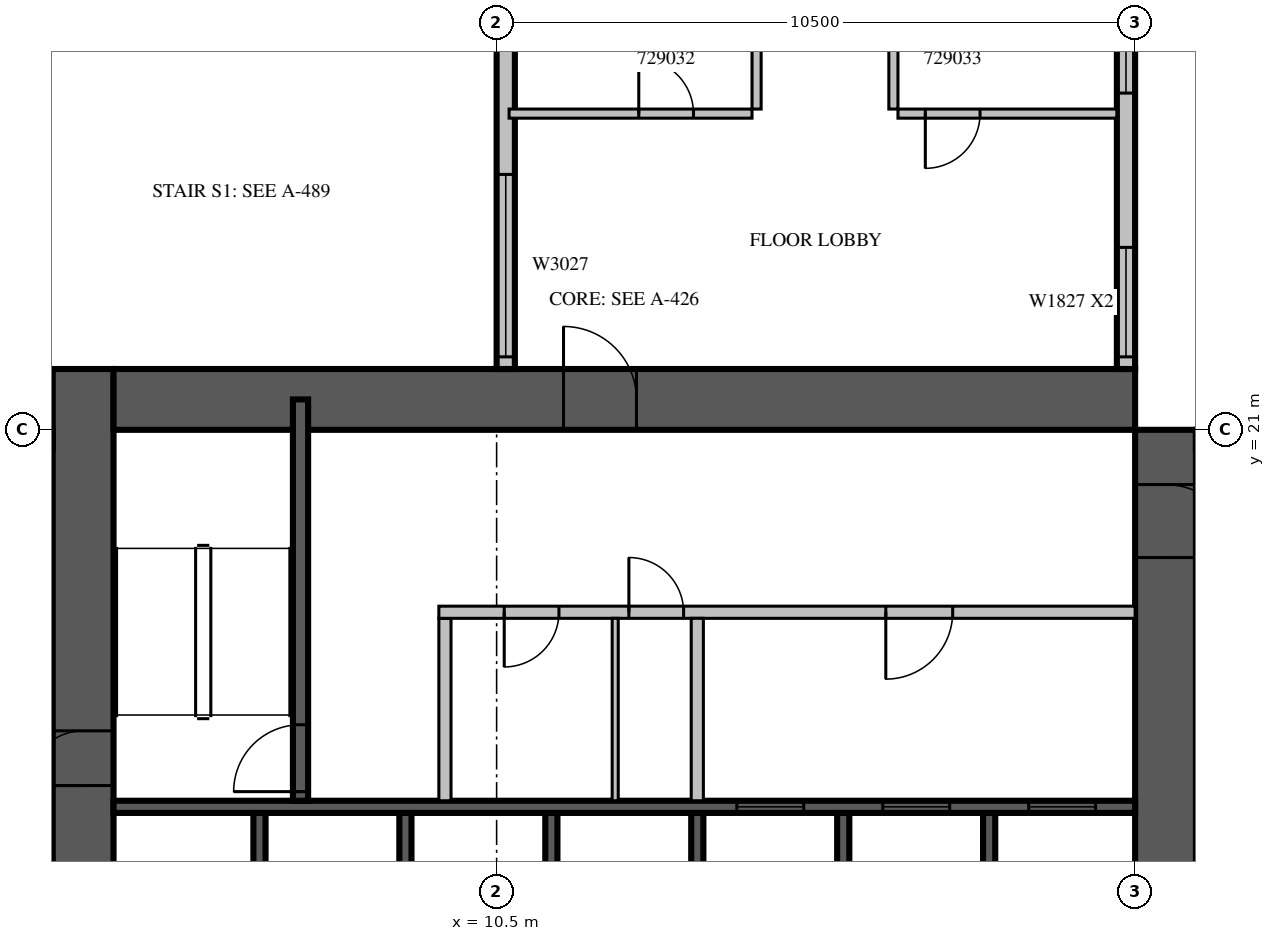
"""IFC4 building model, lengths in metres.
Left out: names, types, materials, properties, quantities, classifications, styles, units other than length and angle.
Written with IfcOpenShell. Run it as: python <this file> out.ifc"""

import sys

from ifc_helpers import new_model, si_unit, direction, frame, frame_2d, origin, place, context, subcontext, project, spatial, rectangle, extrude, source, transform, mapped, element, fill, save


model = new_model("IFC4")
c1 = context("Model", 3, precision=1e-05, world=origin(), true_north=direction((0.0, 1.0)))
c2 = subcontext(c1, "Body", "Model", "MODEL_VIEW")
j1 = project(units=[si_unit("LENGTHUNIT", "METRE"), si_unit("PLANEANGLEUNIT", "RADIAN")], contexts=[c1])
p1 = place(None, origin())
s1 = spatial("IfcSite", under=j1, at=p1, CompositionType="ELEMENT")
p2 = place(p1, origin())
s2 = spatial("IfcBuilding", under=s1, at=p2, CompositionType="ELEMENT")
p3 = place(p2, frame((0.0, 0.0, 132.9)))
s3 = spatial("IfcBuildingStorey", under=s2, at=p3, CompositionType="ELEMENT", Elevation=132.9)
m1 = source(origin(), c2, "Body", "SweptSolid", [
    extrude(rectangle(XDim=17.8, YDim=1.0, at=frame_2d((8.9, 0.0))), origin(), (0.0, 0.0, 1.0), 4.2),
])
p4 = place(p3, frame((3.7, 4.2, 0.0), z_axis=(0.0, 0.0, 1.0), x_axis=(0.0, 1.0, 0.0)))
e1 = element("IfcWall", 1, at=p4, inside=s3, PredefinedType="SHEAR", context=c2, shape_type="MappedRepresentation", body=[
    mapped(m1, transform((0.0, 0.0, 0.0), scale=1.0)),
])
m2 = source(origin(), c2, "Body", "SweptSolid", [
    extrude(rectangle(XDim=2.2, YDim=2.1, at=frame_2d((1.1, 1.05))), frame((0.0, 0.51, 0.0), z_axis=(0.0, -1.0, 0.0), x_axis=(1.0, 0.0, 0.0)), (0.0, 0.0, 1.0), 1.02),
])
p5 = place(p4, frame((4.2, 0.0, 0.0)))
e2 = element("IfcOpeningElement", 2, at=p5, cuts=e1, PredefinedType="OPENING", context=c2, shape_type="MappedRepresentation", body=[
    mapped(m2, transform((0.0, 0.0, 0.0), scale=1.0)),
])
m3 = source(origin(), c2, "Body", "SweptSolid", [
    extrude(rectangle(XDim=0.9, YDim=2.1, at=frame_2d((0.45, 1.05))), frame((0.0, 0.51, 0.0), z_axis=(0.0, -1.0, 0.0), x_axis=(1.0, 0.0, 0.0)), (0.0, 0.0, 1.0), 1.02),
])
p6 = place(p4, frame((10.95, 0.0, 0.0)))
e3 = element("IfcOpeningElement", 3, at=p6, cuts=e1, PredefinedType="OPENING", context=c2, shape_type="MappedRepresentation", body=[
    mapped(m3, transform((0.0, 0.0, 0.0), scale=1.0)),
])
m4 = source(origin(), c2, "Body", "SweptSolid", [
    extrude(rectangle(XDim=16.8, YDim=1.0, at=frame_2d((8.4, 0.0))), origin(), (0.0, 0.0, 1.0), 4.2),
])
p7 = place(p3, frame((21.5, 4.2, 0.0), z_axis=(0.0, 0.0, 1.0), x_axis=(0.0, 1.0, 0.0)))
e4 = element("IfcWall", 4, at=p7, inside=s3, PredefinedType="SHEAR", context=c2, shape_type="MappedRepresentation", body=[
    mapped(m4, transform((0.0, 0.0, 0.0), scale=1.0)),
])
p8 = place(p7, frame((4.2, 0.0, 0.0)))
e5 = element("IfcOpeningElement", 5, at=p8, cuts=e4, PredefinedType="OPENING", context=c2, shape_type="MappedRepresentation", body=[
    mapped(m2, transform((0.0, 0.0, 0.0), scale=1.0)),
])
m5 = source(origin(), c2, "Body", "SweptSolid", [
    extrude(rectangle(XDim=1.2, YDim=2.1, at=frame_2d((0.6, 1.05))), frame((0.0, 0.51, 0.0), z_axis=(0.0, -1.0, 0.0), x_axis=(1.0, 0.0, 0.0)), (0.0, 0.0, 1.0), 1.02),
])
p9 = place(p7, frame((14.7, 0.0, 0.0)))
e6 = element("IfcOpeningElement", 6, at=p9, cuts=e4, PredefinedType="OPENING", context=c2, shape_type="MappedRepresentation", body=[
    mapped(m5, transform((0.0, 0.0, 0.0), scale=1.0)),
])
p10 = place(p3, frame((4.2, 21.5, 0.0), z_axis=(0.0, 0.0, 1.0), x_axis=(1.0, 0.0, 0.0)))
e7 = element("IfcWall", 7, at=p10, inside=s3, PredefinedType="SHEAR", context=c2, shape_type="MappedRepresentation", body=[
    mapped(m4, transform((0.0, 0.0, 0.0), scale=1.0)),
])
p11 = place(p10, frame((7.4, 0.0, 0.0)))
e8 = element("IfcOpeningElement", 8, at=p11, cuts=e7, PredefinedType="OPENING", context=c2, shape_type="MappedRepresentation", body=[
    mapped(m5, transform((0.0, 0.0, 0.0), scale=1.0)),
])
m6 = source(origin(), c2, "Body", "SweptSolid", [
    extrude(rectangle(XDim=6.875, YDim=0.3, at=frame_2d((3.438, 0.0))), origin(), (0.0, 0.0, 1.0), 3.8),
])
p12 = place(p3, frame((20.85, 22.0, 0.0), z_axis=(0.0, 0.0, 1.0), x_axis=(0.0, 1.0, 0.0)))
e9 = element("IfcWall", 9, at=p12, inside=s3, PredefinedType="STANDARD", context=c2, shape_type="MappedRepresentation", body=[
    mapped(m6, transform((0.0, 0.0, 0.0), scale=1.0)),
])
m7 = source(origin(), c2, "Body", "SweptSolid", [
    extrude(rectangle(XDim=1.8, YDim=2.7, at=frame_2d((0.9, 1.35))), frame((0.0, 0.16, 0.0), z_axis=(0.0, -1.0, 0.0), x_axis=(1.0, 0.0, 0.0)), (0.0, 0.0, 1.0), 0.32),
])
p13 = place(p12, frame((0.2, 0.0, 0.6)))
e10 = element("IfcOpeningElement", 10, at=p13, cuts=e9, PredefinedType="OPENING", context=c2, shape_type="MappedRepresentation", body=[
    mapped(m7, transform((0.0, 0.0, 0.0), scale=1.0)),
])
p14 = place(p12, frame((4.537, 0.0, 0.6)))
e11 = element("IfcOpeningElement", 11, at=p14, cuts=e9, PredefinedType="OPENING", context=c2, shape_type="MappedRepresentation", body=[
    mapped(m7, transform((0.0, 0.0, 0.0), scale=1.0)),
])
p15 = place(p3, frame((10.65, 28.875, 0.0), z_axis=(0.0, 0.0, 1.0), x_axis=(0.0, -1.0, 0.0)))
e12 = element("IfcWall", 12, at=p15, inside=s3, PredefinedType="STANDARD", context=c2, shape_type="MappedRepresentation", body=[
    mapped(m6, transform((0.0, 0.0, 0.0), scale=1.0)),
])
m8 = source(origin(), c2, "Body", "SweptSolid", [
    extrude(rectangle(XDim=1.2, YDim=2.7, at=frame_2d((0.6, 1.35))), frame((0.0, 0.16, 0.0), z_axis=(0.0, -1.0, 0.0), x_axis=(1.0, 0.0, 0.0)), (0.0, 0.0, 1.0), 0.32),
])
p16 = place(p15, frame((0.375, 0.0, 0.6)))
e13 = element("IfcOpeningElement", 13, at=p16, cuts=e12, PredefinedType="OPENING", context=c2, shape_type="MappedRepresentation", body=[
    mapped(m8, transform((0.0, 0.0, 0.0), scale=1.0)),
])
m9 = source(origin(), c2, "Body", "SweptSolid", [
    extrude(rectangle(XDim=3.0, YDim=2.7, at=frame_2d((1.5, 1.35))), frame((0.0, 0.16, 0.0), z_axis=(0.0, -1.0, 0.0), x_axis=(1.0, 0.0, 0.0)), (0.0, 0.0, 1.0), 0.32),
])
p17 = place(p15, frame((3.675, 0.0, 0.6)))
e14 = element("IfcOpeningElement", 14, at=p17, cuts=e12, PredefinedType="OPENING", context=c2, shape_type="MappedRepresentation", body=[
    mapped(m9, transform((0.0, 0.0, 0.0), scale=1.0)),
])
m10 = source(origin(), c2, "Body", "SweptSolid", [
    extrude(rectangle(XDim=3.0, YDim=0.2, at=frame_2d((1.5, 0.0))), origin(), (0.0, 0.0, 1.0), 4.2),
])
for number, where, z_axis, x_axis in (
    (15, (6.6, 11.7, 0.0), (0.0, 0.0, 1.0), (0.0, 1.0, 0.0)),
    (16, (9.0, 11.7, 0.0), (0.0, 0.0, 1.0), (0.0, 1.0, 0.0)),
    (17, (11.4, 11.7, 0.0), (0.0, 0.0, 1.0), (0.0, 1.0, 0.0)),
    (18, (13.8, 11.7, 0.0), (0.0, 0.0, 1.0), (0.0, 1.0, 0.0)),
    (19, (16.2, 11.7, 0.0), (0.0, 0.0, 1.0), (0.0, 1.0, 0.0)),
    (20, (18.6, 11.7, 0.0), (0.0, 0.0, 1.0), (0.0, 1.0, 0.0)),
):
    element("IfcWall", number, at=place(p3, frame(where, z_axis=z_axis, x_axis=x_axis)), inside=s3, PredefinedType="SOLIDWALL", context=c2, shape_type="MappedRepresentation", body=[
        mapped(m10, transform((0.0, 0.0, 0.0), scale=1.0)),
    ])
m11 = source(origin(), c2, "Body", "SweptSolid", [
    extrude(rectangle(XDim=16.8, YDim=0.2, at=frame_2d((8.4, 0.0))), origin(), (0.0, 0.0, 1.0), 4.2),
])
p18 = place(p3, frame((4.2, 14.8, 0.0), z_axis=(0.0, 0.0, 1.0), x_axis=(1.0, 0.0, 0.0)))
e21 = element("IfcWall", 21, at=p18, inside=s3, PredefinedType="SOLIDWALL", context=c2, shape_type="MappedRepresentation", body=[
    mapped(m11, transform((0.0, 0.0, 0.0), scale=1.0)),
])
m12 = source(origin(), c2, "Body", "SweptSolid", [
    extrude(rectangle(XDim=1.1, YDim=2.1, at=frame_2d((0.55, 1.05))), frame((0.0, 0.11, 0.0), z_axis=(0.0, -1.0, 0.0), x_axis=(1.0, 0.0, 0.0)), (0.0, 0.0, 1.0), 0.22),
])
p19 = place(p18, frame((10.25, 0.0, 0.0)))
e22 = element("IfcOpeningElement", 22, at=p19, cuts=e21, PredefinedType="OPENING", context=c2, shape_type="MappedRepresentation", body=[
    mapped(m12, transform((0.0, 0.0, 0.0), scale=1.0)),
])
p20 = place(p18, frame((12.65, 0.0, 0.0)))
e23 = element("IfcOpeningElement", 23, at=p20, cuts=e21, PredefinedType="OPENING", context=c2, shape_type="MappedRepresentation", body=[
    mapped(m12, transform((0.0, 0.0, 0.0), scale=1.0)),
])
p21 = place(p18, frame((15.05, 0.0, 0.0)))
e24 = element("IfcOpeningElement", 24, at=p21, cuts=e21, PredefinedType="OPENING", context=c2, shape_type="MappedRepresentation", body=[
    mapped(m12, transform((0.0, 0.0, 0.0), scale=1.0)),
])
m13 = source(origin(), c2, "Body", "SweptSolid", [
    extrude(rectangle(XDim=6.6, YDim=0.25, at=frame_2d((3.3, 0.0))), origin(), (0.0, 0.0, 1.0), 3.8),
])
p22 = place(p3, frame((7.275, 14.9, 0.0), z_axis=(0.0, 0.0, 1.0), x_axis=(0.0, 1.0, 0.0)))
e25 = element("IfcWall", 25, at=p22, inside=s3, PredefinedType="SOLIDWALL", context=c2, shape_type="MappedRepresentation", body=[
    mapped(m13, transform((0.0, 0.0, 0.0), scale=1.0)),
])
m14 = source(origin(), c2, "Body", "SweptSolid", [
    extrude(rectangle(XDim=1.1, YDim=2.1, at=frame_2d((0.55, 1.05))), frame((0.0, 0.135, 0.0), z_axis=(0.0, -1.0, 0.0), x_axis=(1.0, 0.0, 0.0)), (0.0, 0.0, 1.0), 0.27),
])
p23 = place(p22, frame((0.15, 0.0, 0.0)))
e26 = element("IfcOpeningElement", 26, at=p23, cuts=e25, PredefinedType="OPENING", context=c2, shape_type="MappedRepresentation", body=[
    mapped(m14, transform((0.0, 0.0, 0.0), scale=1.0)),
])
m15 = source(origin(), c2, "Body", "SweptSolid", [
    extrude(rectangle(XDim=3.0, YDim=0.2, at=frame_2d((1.5, 0.0))), origin(), (0.0, 0.0, 1.0), 3.8),
])
p24 = place(p3, frame((9.65, 14.9, 0.0), z_axis=(0.0, 0.0, 1.0), x_axis=(0.0, 1.0, 0.0)))
e27 = element("IfcWall", 27, at=p24, inside=s3, PredefinedType="PARTITIONING", context=c2, shape_type="MappedRepresentation", body=[
    mapped(m15, transform((0.0, 0.0, 0.0), scale=1.0)),
])
m16 = source(origin(), c2, "Body", "SweptSolid", [
    extrude(rectangle(XDim=11.45, YDim=0.2, at=frame_2d((5.725, 0.0))), origin(), (0.0, 0.0, 1.0), 3.8),
])
p25 = place(p3, frame((9.55, 18.0, 0.0), z_axis=(0.0, 0.0, 1.0), x_axis=(1.0, 0.0, 0.0)))
e28 = element("IfcWall", 28, at=p25, inside=s3, PredefinedType="PARTITIONING", context=c2, shape_type="MappedRepresentation", body=[
    mapped(m16, transform((0.0, 0.0, 0.0), scale=1.0)),
])
m17 = source(origin(), c2, "Body", "SweptSolid", [
    extrude(rectangle(XDim=0.9, YDim=2.1, at=frame_2d((0.45, 1.05))), frame((0.0, 0.11, 0.0), z_axis=(0.0, -1.0, 0.0), x_axis=(1.0, 0.0, 0.0)), (0.0, 0.0, 1.0), 0.22),
])
p26 = place(p25, frame((1.075, 0.0, 0.0)))
e29 = element("IfcOpeningElement", 29, at=p26, cuts=e28, PredefinedType="OPENING", context=c2, shape_type="MappedRepresentation", body=[
    mapped(m17, transform((0.0, 0.0, 0.0), scale=1.0)),
])
p27 = place(p25, frame((3.125, 0.0, 0.0)))
e30 = element("IfcOpeningElement", 30, at=p27, cuts=e28, PredefinedType="OPENING", context=c2, shape_type="MappedRepresentation", body=[
    mapped(m17, transform((0.0, 0.0, 0.0), scale=1.0)),
])
p28 = place(p25, frame((7.35, 0.0, 0.0)))
e31 = element("IfcOpeningElement", 31, at=p28, cuts=e28, PredefinedType="OPENING", context=c2, shape_type="MappedRepresentation", body=[
    mapped(m12, transform((0.0, 0.0, 0.0), scale=1.0)),
])
p29 = place(p3, frame((13.8, 14.9, 0.0), z_axis=(0.0, 0.0, 1.0), x_axis=(0.0, 1.0, 0.0)))
e32 = element("IfcWall", 32, at=p29, inside=s3, PredefinedType="PARTITIONING", context=c2, shape_type="MappedRepresentation", body=[
    mapped(m15, transform((0.0, 0.0, 0.0), scale=1.0)),
])
m18 = source(origin(), c2, "Body", "SweptSolid", [
    extrude(rectangle(XDim=3.0, YDim=0.1, at=frame_2d((1.5, 0.0))), origin(), (0.0, 0.0, 1.0), 3.8),
])
p30 = place(p3, frame((12.45, 14.9, 0.0), z_axis=(0.0, 0.0, 1.0), x_axis=(0.0, 1.0, 0.0)))
e33 = element("IfcWall", 33, at=p30, inside=s3, PredefinedType="PARTITIONING", context=c2, shape_type="MappedRepresentation", body=[
    mapped(m18, transform((0.0, 0.0, 0.0), scale=1.0)),
])
m19 = source(origin(), c2, "Body", "SweptSolid", [
    extrude(rectangle(XDim=3.995, YDim=0.15, at=frame_2d((1.998, 0.0))), origin(), (0.0, 0.0, 1.0), 3.8),
])
p31 = place(p3, frame((10.705, 26.2, 0.0), z_axis=(0.0, 0.0, 1.0), x_axis=(1.0, 0.0, 0.0)))
e34 = element("IfcWall", 34, at=p31, inside=s3, PredefinedType="PARTITIONING", context=c2, shape_type="MappedRepresentation", body=[
    mapped(m19, transform((0.0, 0.0, 0.0), scale=1.0)),
])
m20 = source(origin(), c2, "Body", "SweptSolid", [
    extrude(rectangle(XDim=0.9, YDim=2.1, at=frame_2d((0.45, 1.05))), frame((0.0, 0.085, 0.0), z_axis=(0.0, -1.0, 0.0), x_axis=(1.0, 0.0, 0.0)), (0.0, 0.0, 1.0), 0.17),
])
p32 = place(p31, frame((2.132, 0.0, 0.0)))
e35 = element("IfcOpeningElement", 35, at=p32, cuts=e34, PredefinedType="OPENING", context=c2, shape_type="MappedRepresentation", body=[
    mapped(m20, transform((0.0, 0.0, 0.0), scale=1.0)),
])
m21 = source(origin(), c2, "Body", "SweptSolid", [
    extrude(rectangle(XDim=3.6, YDim=0.15, at=frame_2d((1.8, 0.0))), origin(), (0.0, 0.0, 1.0), 3.8),
])
p33 = place(p3, frame((17.1, 26.2, 0.0), z_axis=(0.0, 0.0, 1.0), x_axis=(1.0, 0.0, 0.0)))
e36 = element("IfcWall", 36, at=p33, inside=s3, PredefinedType="PARTITIONING", context=c2, shape_type="MappedRepresentation", body=[
    mapped(m21, transform((0.0, 0.0, 0.0), scale=1.0)),
])
p34 = place(p33, frame((0.45, 0.0, 0.0)))
e37 = element("IfcOpeningElement", 37, at=p34, cuts=e36, PredefinedType="OPENING", context=c2, shape_type="MappedRepresentation", body=[
    mapped(m20, transform((0.0, 0.0, 0.0), scale=1.0)),
])
m22 = source(origin(), c2, "Body", "SweptSolid", [
    extrude(rectangle(XDim=3.05, YDim=0.15, at=frame_2d((1.525, 0.0))), origin(), (0.0, 0.0, 1.0), 3.8),
])
for number, where, z_axis, x_axis in (
    (38, (14.775, 26.275, 0.0), (0.0, 0.0, 1.0), (0.0, 1.0, 0.0)),
    (39, (17.025, 29.325, 0.0), (0.0, 0.0, 1.0), (0.0, -1.0, 0.0)),
):
    element("IfcWall", number, at=place(p3, frame(where, z_axis=z_axis, x_axis=x_axis)), inside=s3, PredefinedType="PARTITIONING", context=c2, shape_type="MappedRepresentation", body=[
        mapped(m22, transform((0.0, 0.0, 0.0), scale=1.0)),
    ])
m23 = source(origin(), c2, "Body", "SweptSolid", [
    extrude(rectangle(XDim=1.8, YDim=2.7, at=frame_2d((0.9, 1.35))), frame((0.0, 0.03, 0.0), z_axis=(0.0, -1.0, 0.0), x_axis=(1.0, 0.0, 0.0)), (0.0, 0.0, 1.0), 0.06),
])
p35 = place(p13, origin())
e40 = element("IfcWindow", 40, at=p35, inside=s3, PartitioningType="SINGLE_PANEL", PredefinedType="WINDOW", context=c2, shape_type="MappedRepresentation", body=[
    mapped(m23, transform((0.0, 0.0, 0.0), scale=1.0)),
])
fill(e10, e40)
p36 = place(p14, origin())
e41 = element("IfcWindow", 41, at=p36, inside=s3, PartitioningType="SINGLE_PANEL", PredefinedType="WINDOW", context=c2, shape_type="MappedRepresentation", body=[
    mapped(m23, transform((0.0, 0.0, 0.0), scale=1.0)),
])
fill(e11, e41)
m24 = source(origin(), c2, "Body", "SweptSolid", [
    extrude(rectangle(XDim=3.0, YDim=2.7, at=frame_2d((1.5, 1.35))), frame((0.0, 0.03, 0.0), z_axis=(0.0, -1.0, 0.0), x_axis=(1.0, 0.0, 0.0)), (0.0, 0.0, 1.0), 0.06),
])
p37 = place(p17, origin())
e42 = element("IfcWindow", 42, at=p37, inside=s3, PartitioningType="SINGLE_PANEL", PredefinedType="WINDOW", context=c2, shape_type="MappedRepresentation", body=[
    mapped(m24, transform((0.0, 0.0, 0.0), scale=1.0)),
])
fill(e14, e42)
m25 = source(origin(), c2, "Body", "SweptSolid", [
    extrude(rectangle(XDim=1.1, YDim=2.1, at=frame_2d((0.55, 1.05))), frame((0.0, 0.025, 0.0), z_axis=(0.0, -1.0, 0.0), x_axis=(1.0, 0.0, 0.0)), (0.0, 0.0, 1.0), 0.05),
])
p38 = place(p19, origin())
e43 = element("IfcDoor", 43, at=p38, inside=s3, OperationType="SLIDING_TO_LEFT", PredefinedType="DOOR", context=c2, shape_type="MappedRepresentation", body=[
    mapped(m25, transform((0.0, 0.0, 0.0), scale=1.0)),
])
fill(e22, e43)
p39 = place(p20, origin())
e44 = element("IfcDoor", 44, at=p39, inside=s3, OperationType="SLIDING_TO_LEFT", PredefinedType="DOOR", context=c2, shape_type="MappedRepresentation", body=[
    mapped(m25, transform((0.0, 0.0, 0.0), scale=1.0)),
])
fill(e23, e44)
p40 = place(p21, origin())
e45 = element("IfcDoor", 45, at=p40, inside=s3, OperationType="SLIDING_TO_LEFT", PredefinedType="DOOR", context=c2, shape_type="MappedRepresentation", body=[
    mapped(m25, transform((0.0, 0.0, 0.0), scale=1.0)),
])
fill(e24, e45)
p41 = place(p23, origin())
e46 = element("IfcDoor", 46, at=p41, inside=s3, OperationType="SINGLE_SWING_LEFT", PredefinedType="DOOR", context=c2, shape_type="MappedRepresentation", body=[
    mapped(m25, transform((0.0, 0.0, 0.0), scale=1.0)),
])
fill(e26, e46)
m26 = source(origin(), c2, "Body", "SweptSolid", [
    extrude(rectangle(XDim=0.9, YDim=2.1, at=frame_2d((0.45, 1.05))), frame((0.0, 0.025, 0.0), z_axis=(0.0, -1.0, 0.0), x_axis=(1.0, 0.0, 0.0)), (0.0, 0.0, 1.0), 0.05),
])
p42 = place(p26, origin())
e47 = element("IfcDoor", 47, at=p42, inside=s3, OperationType="SINGLE_SWING_RIGHT", PredefinedType="DOOR", context=c2, shape_type="MappedRepresentation", body=[
    mapped(m26, transform((0.0, 0.0, 0.0), scale=1.0)),
])
fill(e29, e47)
p43 = place(p27, origin())
e48 = element("IfcDoor", 48, at=p43, inside=s3, OperationType="SINGLE_SWING_LEFT", PredefinedType="DOOR", context=c2, shape_type="MappedRepresentation", body=[
    mapped(m26, transform((0.0, 0.0, 0.0), scale=1.0)),
])
fill(e30, e48)
p44 = place(p28, origin())
e49 = element("IfcDoor", 49, at=p44, inside=s3, OperationType="SINGLE_SWING_RIGHT", PredefinedType="DOOR", context=c2, shape_type="MappedRepresentation", body=[
    mapped(m25, transform((0.0, 0.0, 0.0), scale=1.0)),
])
fill(e31, e49)
m27 = source(origin(), c2, "Body", "SweptSolid", [
    extrude(rectangle(XDim=1.2, YDim=2.1, at=frame_2d((0.6, 1.05))), frame((0.0, 0.025, 0.0), z_axis=(0.0, -1.0, 0.0), x_axis=(1.0, 0.0, 0.0)), (0.0, 0.0, 1.0), 0.05),
])
p45 = place(p11, origin())
e50 = element("IfcDoor", 50, at=p45, inside=s3, OperationType="SINGLE_SWING_LEFT", PredefinedType="DOOR", context=c2, shape_type="MappedRepresentation", body=[
    mapped(m27, transform((0.0, 0.0, 0.0), scale=1.0)),
])
fill(e8, e50)
p46 = place(p9, origin())
e51 = element("IfcDoor", 51, at=p46, inside=s3, OperationType="SINGLE_SWING_RIGHT", PredefinedType="DOOR", context=c2, shape_type="MappedRepresentation", body=[
    mapped(m27, transform((0.0, 0.0, 0.0), scale=1.0)),
])
fill(e6, e51)
p47 = place(p6, origin())
e52 = element("IfcDoor", 52, at=p47, inside=s3, OperationType="SINGLE_SWING_LEFT", PredefinedType="DOOR", context=c2, shape_type="MappedRepresentation", body=[
    mapped(m26, transform((0.0, 0.0, 0.0), scale=1.0)),
])
fill(e3, e52)
p48 = place(p32, origin())
e53 = element("IfcDoor", 53, at=p48, inside=s3, OperationType="SINGLE_SWING_LEFT", PredefinedType="DOOR", context=c2, shape_type="MappedRepresentation", body=[
    mapped(m26, transform((0.0, 0.0, 0.0), scale=1.0)),
])
fill(e35, e53)
p49 = place(p34, origin())
e54 = element("IfcDoor", 54, at=p49, inside=s3, OperationType="SINGLE_SWING_RIGHT", PredefinedType="DOOR", context=c2, shape_type="MappedRepresentation", body=[
    mapped(m26, transform((0.0, 0.0, 0.0), scale=1.0)),
])
fill(e37, e54)
save(model, sys.argv[1])
